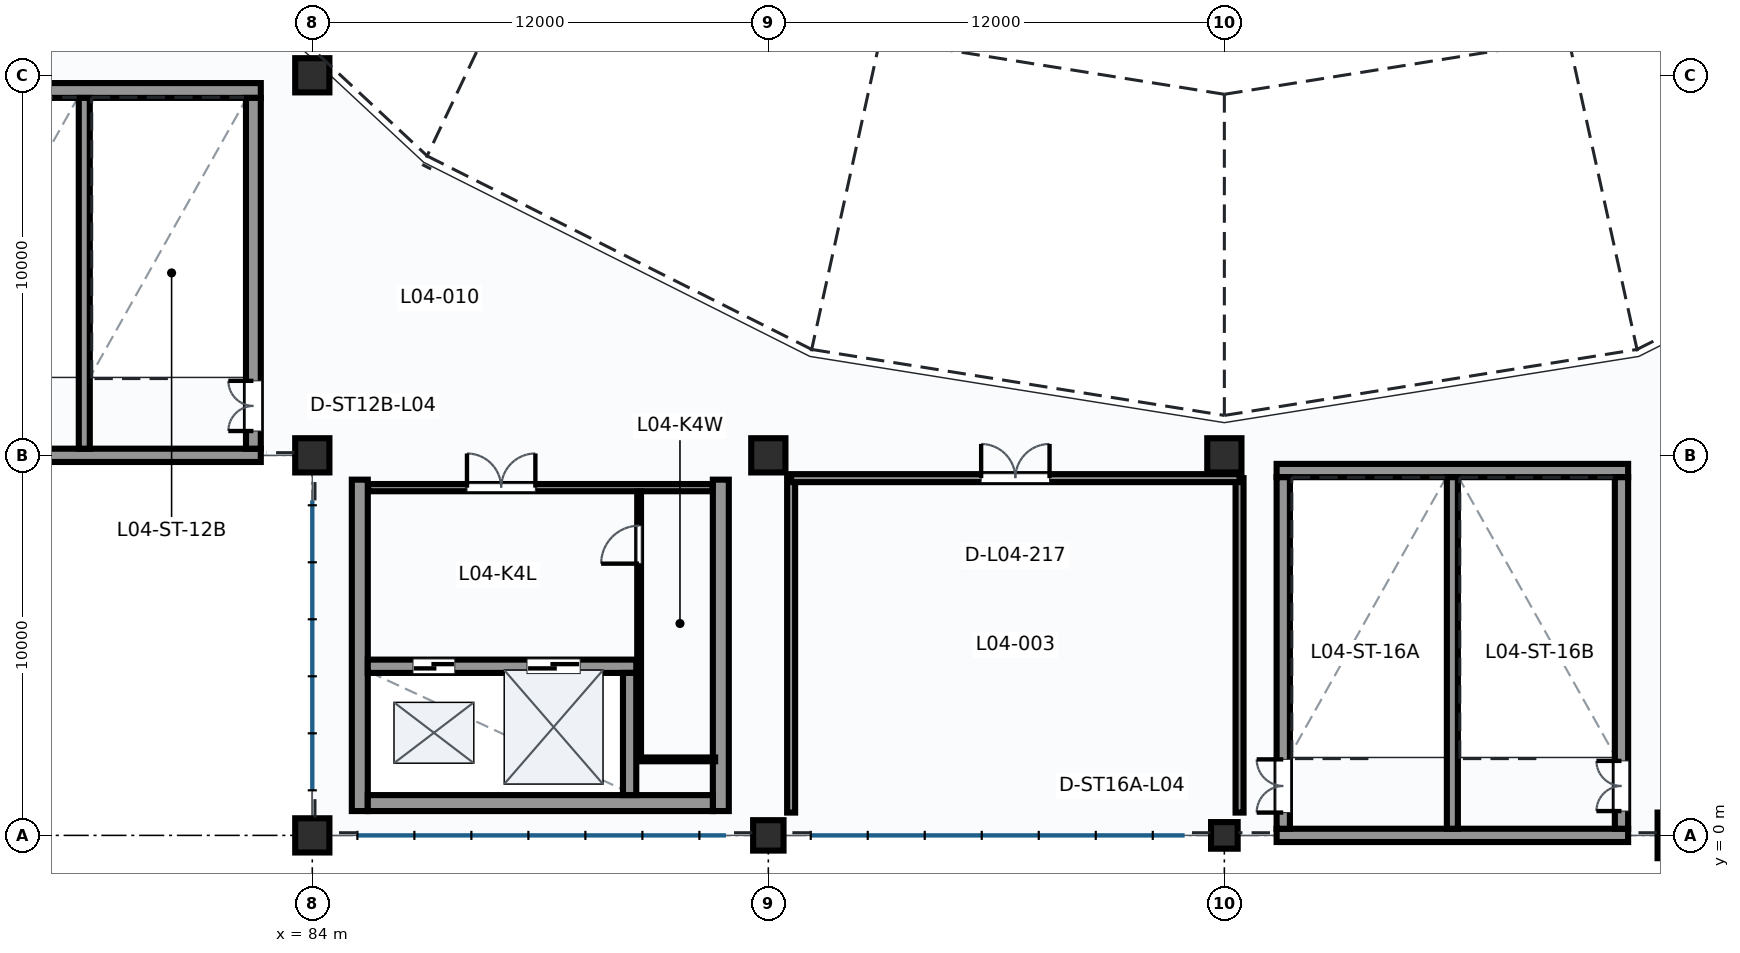
"""IFC4 building model, lengths in metres.
Left out: names, types, materials, properties, quantities, classifications, styles, units other than length and angle.
Written with IfcOpenShell. Run it as: python <this file> out.ifc"""

import sys

from ifc_helpers import new_model, si_unit, direction, frame, frame_2d, origin, origin_2d, place, context, subcontext, project, spatial, rectangle, circle, extrude, element, fill, save


model = new_model("IFC4")
c1 = context("Model", 3, precision=1e-05, world=origin(), true_north=direction((0.0, 1.0)))
c2 = subcontext(c1, "Body", "Model", "MODEL_VIEW")
j1 = project(units=[si_unit("LENGTHUNIT", "METRE"), si_unit("PLANEANGLEUNIT", "RADIAN")], contexts=[c1])
p1 = place(None, origin())
s1 = spatial("IfcSite", under=j1, at=p1, CompositionType="ELEMENT")
p2 = place(p1, origin())
s2 = spatial("IfcBuilding", under=s1, at=p2, CompositionType="ELEMENT")
p3 = place(p2, frame((0.0, 0.0, 19.2)))
s3 = spatial("IfcBuildingStorey", under=s2, at=p3, CompositionType="ELEMENT", Elevation=19.2)
p4 = place(p3, frame((84.0, 0.0, 0.0), z_axis=(0.0, 0.0, 1.0), x_axis=(1.0, 0.0, 0.0)))
e1 = element("IfcColumn", 1, at=p4, inside=s3, PredefinedType="COLUMN", context=c2, shape_type="SweptSolid", body=[
    extrude(circle(Radius=0.45, at=origin_2d()), origin(), (0.0, 0.0, 1.0), 5.4),
])
for number, where, z_axis, x_axis in (
    (2, (84.0, 10.0, 0.0), (0.0, 0.0, 1.0), (1.0, 0.0, 0.0)),
    (3, (84.0, 20.0, 0.0), (0.0, 0.0, 1.0), (1.0, 0.0, 0.0)),
):
    element("IfcColumn", number, at=place(p3, frame(where, z_axis=z_axis, x_axis=x_axis)), inside=s3, PredefinedType="COLUMN", context=c2, shape_type="SweptSolid", body=[
        extrude(rectangle(XDim=0.9, YDim=0.9, at=origin_2d()), origin(), (0.0, 0.0, 1.0), 5.4),
    ])
p5 = place(p3, frame((96.0, 0.0, 0.0), z_axis=(0.0, 0.0, 1.0), x_axis=(1.0, 0.0, 0.0)))
e4 = element("IfcColumn", 4, at=p5, inside=s3, PredefinedType="COLUMN", context=c2, shape_type="SweptSolid", body=[
    extrude(circle(Radius=0.4, at=origin_2d()), origin(), (0.0, 0.0, 1.0), 5.4),
])
p6 = place(p3, frame((96.0, 10.0, 0.0), z_axis=(0.0, 0.0, 1.0), x_axis=(1.0, 0.0, 0.0)))
e5 = element("IfcColumn", 5, at=p6, inside=s3, PredefinedType="COLUMN", context=c2, shape_type="SweptSolid", body=[
    extrude(rectangle(XDim=0.9, YDim=0.9, at=origin_2d()), origin(), (0.0, 0.0, 1.0), 5.4),
])
p7 = place(p3, frame((108.0, 0.0, 0.0), z_axis=(0.0, 0.0, 1.0), x_axis=(1.0, 0.0, 0.0)))
e6 = element("IfcColumn", 6, at=p7, inside=s3, PredefinedType="COLUMN", context=c2, shape_type="SweptSolid", body=[
    extrude(circle(Radius=0.35, at=origin_2d()), origin(), (0.0, 0.0, 1.0), 5.4),
])
p8 = place(p3, frame((108.0, 10.0, 0.0), z_axis=(0.0, 0.0, 1.0), x_axis=(1.0, 0.0, 0.0)))
e7 = element("IfcColumn", 7, at=p8, inside=s3, PredefinedType="COLUMN", context=c2, shape_type="SweptSolid", body=[
    extrude(rectangle(XDim=0.9, YDim=0.9, at=origin_2d()), origin(), (0.0, 0.0, 1.0), 5.4),
])
p9 = place(p3, frame((120.0, 0.0, 0.0), z_axis=(0.0, 0.0, 1.0), x_axis=(1.0, 0.0, 0.0)))
e8 = element("IfcColumn", 8, at=p9, inside=s3, PredefinedType="COLUMN", context=c2, shape_type="SweptSolid", body=[
    extrude(rectangle(XDim=1.2, YDim=1.2, at=origin_2d()), origin(), (0.0, 0.0, 1.0), 5.4),
])
p10 = place(p3, frame((73.355, 10.0, 0.0), z_axis=(0.0, 0.0, 1.0), x_axis=(1.0, 0.0, 0.0)))
e9 = element("IfcWall", 9, at=p10, inside=s3, PredefinedType="SHEAR", context=c2, shape_type="SweptSolid", body=[
    extrude(rectangle(XDim=9.29, YDim=0.35, at=frame_2d((4.645, 0.0))), origin(), (0.0, 0.0, 1.0), 4.506),
])
p11 = place(p3, frame((73.355, 19.6, 0.0), z_axis=(0.0, 0.0, 1.0), x_axis=(1.0, 0.0, 0.0)))
e10 = element("IfcWall", 10, at=p11, inside=s3, PredefinedType="SHEAR", context=c2, shape_type="SweptSolid", body=[
    extrude(rectangle(XDim=9.29, YDim=0.39, at=frame_2d((4.645, 0.0))), origin(), (0.0, 0.0, 1.0), 5.4),
])
p12 = place(p3, frame((82.45, 10.175, 0.0), z_axis=(0.0, 0.0, 1.0), x_axis=(0.0, 1.0, 0.0)))
e11 = element("IfcWall", 11, at=p12, inside=s3, PredefinedType="SHEAR", context=c2, shape_type="SweptSolid", body=[
    extrude(rectangle(XDim=9.23, YDim=0.39, at=frame_2d((4.615, 0.0))), origin(), (0.0, 0.0, 1.0), 5.4),
])
p13 = place(p12, frame((0.465, 0.0, 0.0)))
e12 = element("IfcOpeningElement", 12, at=p13, cuts=e11, PredefinedType="OPENING", context=c2, shape_type="SweptSolid", body=[
    extrude(rectangle(XDim=1.32, YDim=2.2, at=frame_2d((0.66, 1.1))), frame((0.0, 0.205, 0.0), z_axis=(0.0, -1.0, 0.0), x_axis=(1.0, 0.0, 0.0)), (0.0, 0.0, 1.0), 0.41),
])
p14 = place(p3, frame((78.0, 10.175, 0.0), z_axis=(0.0, 0.0, 1.0), x_axis=(0.0, 1.0, 0.0)))
e13 = element("IfcWall", 13, at=p14, inside=s3, PredefinedType="SHEAR", context=c2, shape_type="SweptSolid", body=[
    extrude(rectangle(XDim=9.23, YDim=0.29, at=frame_2d((4.615, 0.0))), origin(), (0.0, 0.0, 1.0), 5.4),
])
for number, where, z_axis, x_axis in (
    (14, (109.375, 0.0, 0.0), (0.0, 0.0, 1.0), (1.0, 0.0, 0.0)),
    (15, (109.375, 9.6, 0.0), (0.0, 0.0, 1.0), (1.0, 0.0, 0.0)),
):
    element("IfcWall", number, at=place(p3, frame(where, z_axis=z_axis, x_axis=x_axis)), inside=s3, PredefinedType="SHEAR", context=c2, shape_type="SweptSolid", body=[
        extrude(rectangle(XDim=9.25, YDim=0.35, at=frame_2d((4.625, 0.0))), origin(), (0.0, 0.0, 1.0), 5.4),
    ])
p15 = place(p3, frame((109.55, 0.175, 0.0), z_axis=(0.0, 0.0, 1.0), x_axis=(0.0, 1.0, 0.0)))
e16 = element("IfcWall", 16, at=p15, inside=s3, PredefinedType="SHEAR", context=c2, shape_type="SweptSolid", body=[
    extrude(rectangle(XDim=9.25, YDim=0.35, at=frame_2d((4.625, 0.0))), origin(), (0.0, 0.0, 1.0), 5.4),
])
p16 = place(p15, frame((0.425, 0.0, 0.0)))
e17 = element("IfcOpeningElement", 17, at=p16, cuts=e16, PredefinedType="OPENING", context=c2, shape_type="SweptSolid", body=[
    extrude(rectangle(XDim=1.4, YDim=2.2, at=frame_2d((0.7, 1.1))), frame((0.0, 0.185, 0.0), z_axis=(0.0, -1.0, 0.0), x_axis=(1.0, 0.0, 0.0)), (0.0, 0.0, 1.0), 0.37),
])
p17 = place(p3, frame((118.45, 0.175, 0.0), z_axis=(0.0, 0.0, 1.0), x_axis=(0.0, 1.0, 0.0)))
e18 = element("IfcWall", 18, at=p17, inside=s3, PredefinedType="SHEAR", context=c2, shape_type="SweptSolid", body=[
    extrude(rectangle(XDim=9.25, YDim=0.35, at=frame_2d((4.625, 0.0))), origin(), (0.0, 0.0, 1.0), 5.4),
])
p18 = place(p17, frame((0.465, 0.0, 0.0)))
e19 = element("IfcOpeningElement", 19, at=p18, cuts=e18, PredefinedType="OPENING", context=c2, shape_type="SweptSolid", body=[
    extrude(rectangle(XDim=1.32, YDim=2.2, at=frame_2d((0.66, 1.1))), frame((0.0, 0.185, 0.0), z_axis=(0.0, -1.0, 0.0), x_axis=(1.0, 0.0, 0.0)), (0.0, 0.0, 1.0), 0.37),
])
p19 = place(p3, frame((114.0, 0.175, 0.0), z_axis=(0.0, 0.0, 1.0), x_axis=(0.0, 1.0, 0.0)))
e20 = element("IfcWall", 20, at=p19, inside=s3, PredefinedType="SHEAR", context=c2, shape_type="SweptSolid", body=[
    extrude(rectangle(XDim=9.25, YDim=0.29, at=frame_2d((4.625, 0.0))), origin(), (0.0, 0.0, 1.0), 5.4),
])
for number, where, z_axis, x_axis in (
    (21, (85.25, 0.64, 0.0), (0.0, 0.0, 1.0), (0.0, 1.0, 0.0)),
    (22, (94.75, 0.64, 0.0), (0.0, 0.0, 1.0), (0.0, 1.0, 0.0)),
):
    element("IfcWall", number, at=place(p3, frame(where, z_axis=z_axis, x_axis=x_axis)), inside=s3, PredefinedType="SHEAR", context=c2, shape_type="SweptSolid", body=[
        extrude(rectangle(XDim=8.72, YDim=0.42, at=frame_2d((4.36, 0.0))), origin(), (0.0, 0.0, 1.0), 5.4),
    ])
p20 = place(p3, frame((85.46, 0.85, 0.0), z_axis=(0.0, 0.0, 1.0), x_axis=(1.0, 0.0, 0.0)))
e23 = element("IfcWall", 23, at=p20, inside=s3, PredefinedType="SHEAR", context=c2, shape_type="SweptSolid", body=[
    extrude(rectangle(XDim=9.08, YDim=0.42, at=frame_2d((4.54, 0.0))), origin(), (0.0, 0.0, 1.0), 5.4),
])
p21 = place(p3, frame((85.46, 4.45, 0.0), z_axis=(0.0, 0.0, 1.0), x_axis=(1.0, 0.0, 0.0)))
e24 = element("IfcWall", 24, at=p21, inside=s3, PredefinedType="SHEAR", context=c2, shape_type="SweptSolid", body=[
    extrude(rectangle(XDim=7.065, YDim=0.35, at=frame_2d((3.532, 0.0))), origin(), (0.0, 0.0, 1.0), 5.4),
])
p22 = place(p21, frame((1.19, 0.0, 0.0)))
e25 = element("IfcOpeningElement", 25, at=p22, cuts=e24, PredefinedType="OPENING", context=c2, shape_type="SweptSolid", body=[
    extrude(rectangle(XDim=1.1, YDim=2.2, at=frame_2d((0.55, 1.1))), frame((0.0, 0.185, 0.0), z_axis=(0.0, -1.0, 0.0), x_axis=(1.0, 0.0, 0.0)), (0.0, 0.0, 1.0), 0.37),
])
p23 = place(p21, frame((4.19, 0.0, 0.0)))
e26 = element("IfcOpeningElement", 26, at=p23, cuts=e24, PredefinedType="OPENING", context=c2, shape_type="SweptSolid", body=[
    extrude(rectangle(XDim=1.4, YDim=2.3, at=frame_2d((0.7, 1.15))), frame((0.0, 0.185, 0.0), z_axis=(0.0, -1.0, 0.0), x_axis=(1.0, 0.0, 0.0)), (0.0, 0.0, 1.0), 0.37),
])
p24 = place(p3, frame((92.35, 1.06, 0.0), z_axis=(0.0, 0.0, 1.0), x_axis=(0.0, 1.0, 0.0)))
e27 = element("IfcWall", 27, at=p24, inside=s3, PredefinedType="SHEAR", context=c2, shape_type="SweptSolid", body=[
    extrude(rectangle(XDim=3.215, YDim=0.35, at=frame_2d((1.607, 0.0))), origin(), (0.0, 0.0, 1.0), 5.4),
])
p25 = place(p3, frame((85.47, 9.15, 0.0), z_axis=(0.0, 0.0, 1.0), x_axis=(1.0, 0.0, 0.0)))
e28 = element("IfcWall", 28, at=p25, inside=s3, PredefinedType="PARTITIONING", context=c2, shape_type="SweptSolid", body=[
    extrude(rectangle(XDim=9.06, YDim=0.19, at=frame_2d((4.53, 0.0))), origin(), (0.0, 0.0, 1.0), 5.07),
])
p26 = place(p25, frame((2.6, 0.0, 0.0)))
e29 = element("IfcOpeningElement", 29, at=p26, cuts=e28, PredefinedType="OPENING", context=c2, shape_type="SweptSolid", body=[
    extrude(rectangle(XDim=1.8, YDim=2.3, at=frame_2d((0.9, 1.15))), frame((0.0, 0.105, 0.0), z_axis=(0.0, -1.0, 0.0), x_axis=(1.0, 0.0, 0.0)), (0.0, 0.0, 1.0), 0.21),
])
p27 = place(p3, frame((92.6, 2.0, 0.0), z_axis=(0.0, 0.0, 1.0), x_axis=(0.0, 1.0, 0.0)))
e30 = element("IfcWall", 30, at=p27, inside=s3, PredefinedType="PARTITIONING", context=c2, shape_type="SweptSolid", body=[
    extrude(rectangle(XDim=7.05, YDim=0.1, at=frame_2d((3.525, 0.0))), origin(), (0.0, 0.0, 1.0), 5.07),
])
p28 = place(p27, frame((5.15, 0.0, 0.0)))
e31 = element("IfcOpeningElement", 31, at=p28, cuts=e30, PredefinedType="OPENING", context=c2, shape_type="SweptSolid", body=[
    extrude(rectangle(XDim=1.0, YDim=2.1, at=frame_2d((0.5, 1.05))), frame((0.0, 0.06, 0.0), z_axis=(0.0, -1.0, 0.0), x_axis=(1.0, 0.0, 0.0)), (0.0, 0.0, 1.0), 0.12),
])
p29 = place(p3, frame((92.6, 2.0, 0.0), z_axis=(0.0, 0.0, 1.0), x_axis=(1.0, 0.0, 0.0)))
e32 = element("IfcWall", 32, at=p29, inside=s3, PredefinedType="PARTITIONING", context=c2, shape_type="SweptSolid", body=[
    extrude(rectangle(XDim=2.0, YDim=0.1, at=frame_2d((1.0, 0.0))), origin(), (0.0, 0.0, 1.0), 5.07),
])
for number, where, z_axis, x_axis in (
    (33, (108.4, 9.4, 0.0), (0.0, 0.0, 1.0), (0.0, -1.0, 0.0)),
    (34, (96.6, 0.6, 0.0), (0.0, 0.0, 1.0), (0.0, 1.0, 0.0)),
):
    element("IfcWall", number, at=place(p3, frame(where, z_axis=z_axis, x_axis=x_axis)), inside=s3, PredefinedType="SOLIDWALL", context=c2, shape_type="SweptSolid", body=[
        extrude(rectangle(XDim=8.8, YDim=0.21, at=frame_2d((4.4, 0.0))), origin(), (0.0, 0.0, 1.0), 5.07),
    ])
p30 = place(p3, frame((96.6, 9.4, 0.0), z_axis=(0.0, 0.0, 1.0), x_axis=(1.0, 0.0, 0.0)))
e35 = element("IfcWall", 35, at=p30, inside=s3, PredefinedType="SOLIDWALL", context=c2, shape_type="SweptSolid", body=[
    extrude(rectangle(XDim=11.8, YDim=0.21, at=frame_2d((5.9, 0.0))), origin(), (0.0, 0.0, 1.0), 5.07),
])
p31 = place(p30, frame((5.0, 0.0, 0.0)))
e36 = element("IfcOpeningElement", 36, at=p31, cuts=e35, PredefinedType="OPENING", context=c2, shape_type="SweptSolid", body=[
    extrude(rectangle(XDim=1.8, YDim=2.3, at=frame_2d((0.9, 1.15))), frame((0.0, 0.115, 0.0), z_axis=(0.0, -1.0, 0.0), x_axis=(1.0, 0.0, 0.0)), (0.0, 0.0, 1.0), 0.23),
])
p32 = place(p13, origin())
e37 = element("IfcDoor", 37, at=p32, inside=s3, OperationType="DOUBLE_DOOR_SINGLE_SWING", PredefinedType="DOOR", context=c2, shape_type="SweptSolid", body=[
    extrude(rectangle(XDim=1.32, YDim=2.2, at=frame_2d((0.66, 1.1))), frame((0.0, 0.025, 0.0), z_axis=(0.0, -1.0, 0.0), x_axis=(1.0, 0.0, 0.0)), (0.0, 0.0, 1.0), 0.05),
])
fill(e12, e37)
p33 = place(p16, frame((1.4, 0.0, 0.0), z_axis=(0.0, 0.0, 1.0), x_axis=(-1.0, 0.0, 0.0)))
e38 = element("IfcDoor", 38, at=p33, inside=s3, OperationType="DOUBLE_DOOR_SINGLE_SWING", PredefinedType="DOOR", context=c2, shape_type="SweptSolid", body=[
    extrude(rectangle(XDim=1.4, YDim=2.2, at=frame_2d((0.7, 1.1))), frame((0.0, 0.025, 0.0), z_axis=(0.0, -1.0, 0.0), x_axis=(1.0, 0.0, 0.0)), (0.0, 0.0, 1.0), 0.05),
])
fill(e17, e38)
p34 = place(p18, origin())
e39 = element("IfcDoor", 39, at=p34, inside=s3, OperationType="DOUBLE_DOOR_SINGLE_SWING", PredefinedType="DOOR", context=c2, shape_type="SweptSolid", body=[
    extrude(rectangle(XDim=1.32, YDim=2.2, at=frame_2d((0.66, 1.1))), frame((0.0, 0.025, 0.0), z_axis=(0.0, -1.0, 0.0), x_axis=(1.0, 0.0, 0.0)), (0.0, 0.0, 1.0), 0.05),
])
fill(e19, e39)
p35 = place(p22, origin())
e40 = element("IfcDoor", 40, at=p35, inside=s3, OperationType="SLIDING_TO_LEFT", PredefinedType="DOOR", context=c2, shape_type="SweptSolid", body=[
    extrude(rectangle(XDim=1.1, YDim=2.2, at=frame_2d((0.55, 1.1))), frame((0.0, 0.025, 0.0), z_axis=(0.0, -1.0, 0.0), x_axis=(1.0, 0.0, 0.0)), (0.0, 0.0, 1.0), 0.05),
])
fill(e25, e40)
p36 = place(p23, origin())
e41 = element("IfcDoor", 41, at=p36, inside=s3, OperationType="SLIDING_TO_LEFT", PredefinedType="DOOR", context=c2, shape_type="SweptSolid", body=[
    extrude(rectangle(XDim=1.4, YDim=2.3, at=frame_2d((0.7, 1.15))), frame((0.0, 0.025, 0.0), z_axis=(0.0, -1.0, 0.0), x_axis=(1.0, 0.0, 0.0)), (0.0, 0.0, 1.0), 0.05),
])
fill(e26, e41)
p37 = place(p26, origin())
e42 = element("IfcDoor", 42, at=p37, inside=s3, OperationType="DOUBLE_DOOR_SINGLE_SWING", PredefinedType="DOOR", context=c2, shape_type="SweptSolid", body=[
    extrude(rectangle(XDim=1.8, YDim=2.3, at=frame_2d((0.9, 1.15))), frame((0.0, 0.025, 0.0), z_axis=(0.0, -1.0, 0.0), x_axis=(1.0, 0.0, 0.0)), (0.0, 0.0, 1.0), 0.05),
])
fill(e29, e42)
p38 = place(p28, origin())
e43 = element("IfcDoor", 43, at=p38, inside=s3, OperationType="SINGLE_SWING_LEFT", PredefinedType="DOOR", context=c2, shape_type="SweptSolid", body=[
    extrude(rectangle(XDim=1.0, YDim=2.1, at=frame_2d((0.5, 1.05))), frame((0.0, 0.025, 0.0), z_axis=(0.0, -1.0, 0.0), x_axis=(1.0, 0.0, 0.0)), (0.0, 0.0, 1.0), 0.05),
])
fill(e31, e43)
p39 = place(p31, origin())
e44 = element("IfcDoor", 44, at=p39, inside=s3, OperationType="DOUBLE_DOOR_SINGLE_SWING", PredefinedType="DOOR", context=c2, shape_type="SweptSolid", body=[
    extrude(rectangle(XDim=1.8, YDim=2.3, at=frame_2d((0.9, 1.15))), frame((0.0, 0.025, 0.0), z_axis=(0.0, -1.0, 0.0), x_axis=(1.0, 0.0, 0.0)), (0.0, 0.0, 1.0), 0.05),
])
fill(e36, e44)
save(model, sys.argv[1])
